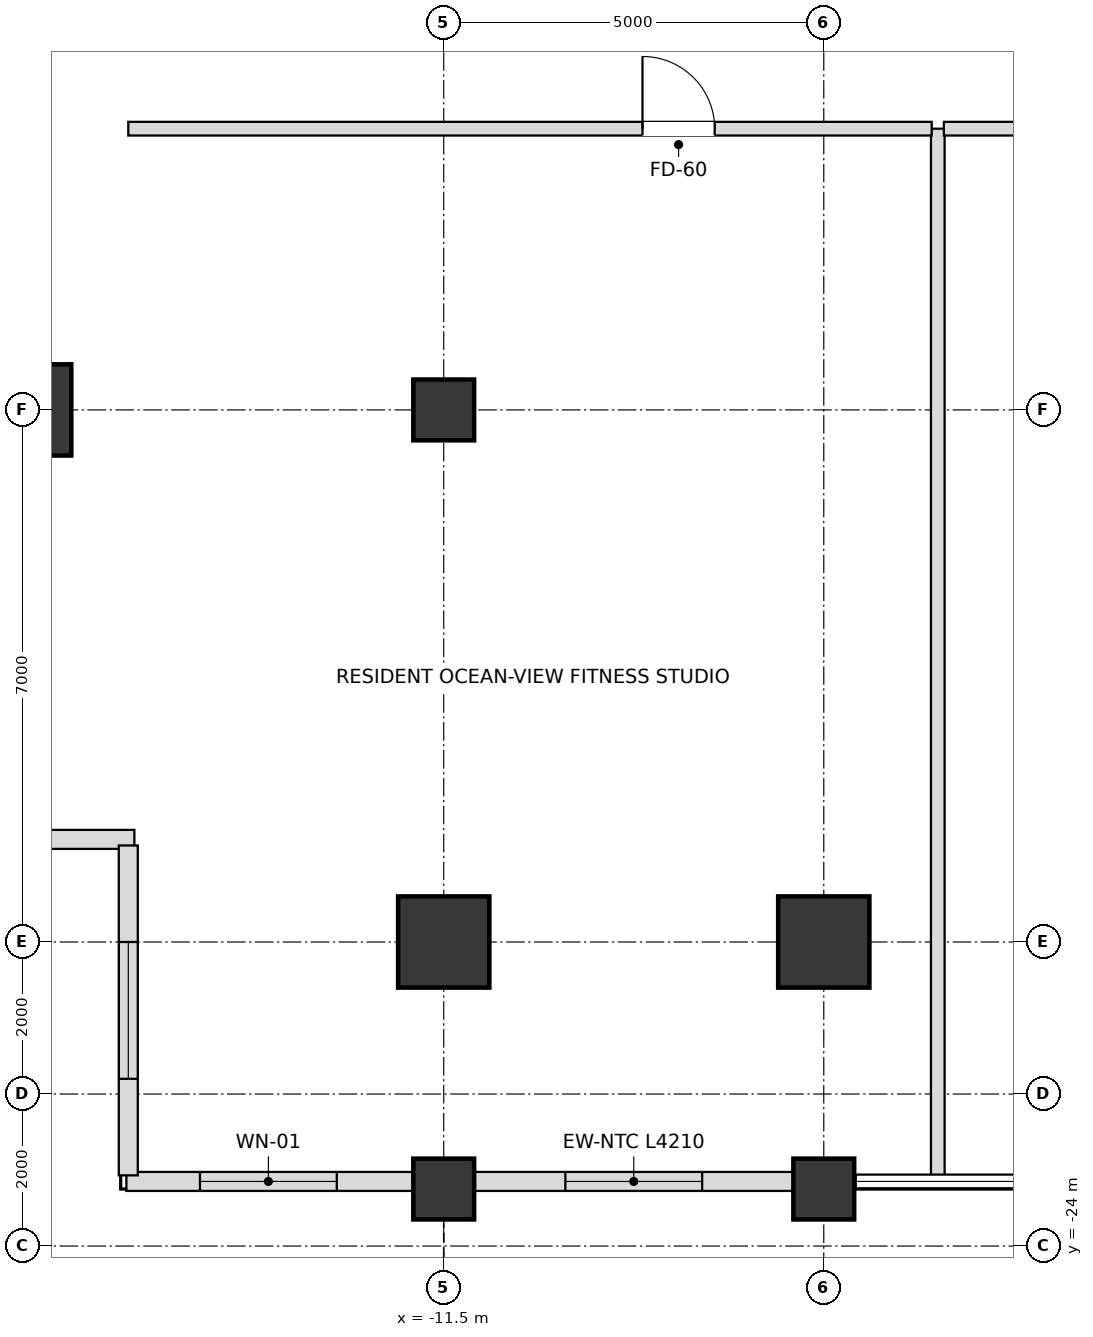
"""IFC4 building model, lengths in metres.
Left out: names, types, materials, properties, quantities, classifications, styles, units other than length and angle.
Written with IfcOpenShell. Run it as: python <this file> out.ifc"""

import sys

from ifc_helpers import new_model, si_unit, direction, frame, frame_2d, origin, origin_2d, place, context, subcontext, project, spatial, rectangle, extrude, element, fill, save


model = new_model("IFC4")
c1 = context("Model", 3, precision=1e-05, world=origin(), true_north=direction((0.0, 1.0)))
c2 = subcontext(c1, "Body", "Model", "MODEL_VIEW")
j1 = project(units=[si_unit("LENGTHUNIT", "METRE"), si_unit("PLANEANGLEUNIT", "RADIAN")], contexts=[c1])
p1 = place(None, origin())
s1 = spatial("IfcSite", under=j1, at=p1, CompositionType="ELEMENT")
p2 = place(p1, origin())
s2 = spatial("IfcBuilding", under=s1, at=p2, CompositionType="ELEMENT")
p3 = place(p2, frame((0.0, 0.0, 109.8)))
s3 = spatial("IfcBuildingStorey", under=s2, at=p3, CompositionType="ELEMENT", Elevation=109.8)
for number, where, z_axis, x_axis in (
    (1, (-11.5, -20.0, 0.0), (0.0, 0.0, 1.0), (1.0, 0.0, 0.0)),
    (2, (-6.5, -20.0, 0.0), (0.0, 0.0, 1.0), (1.0, 0.0, 0.0)),
    (3, (-17.0, -13.0, 0.0), (0.0, 0.0, 1.0), (1.0, 0.0, 0.0)),
):
    element("IfcColumn", number, at=place(p3, frame(where, z_axis=z_axis, x_axis=x_axis)), inside=s3, PredefinedType="USERDEFINED", context=c2, shape_type="SweptSolid", body=[
        extrude(rectangle(XDim=1.2, YDim=1.2, at=origin_2d()), origin(), (0.0, 0.0, 1.0), 3.6),
    ])
for number, where, z_axis, x_axis in (
    (4, (-11.5, -13.0, 0.0), (0.0, 0.0, 1.0), (1.0, 0.0, 0.0)),
    (5, (-11.5, -23.25, 0.0), (0.0, 0.0, 1.0), (1.0, 0.0, 0.0)),
    (6, (-6.5, -23.25, 0.0), (0.0, 0.0, 1.0), (1.0, 0.0, 0.0)),
):
    element("IfcColumn", number, at=place(p3, frame(where, z_axis=z_axis, x_axis=x_axis)), inside=s3, PredefinedType="COLUMN", context=c2, shape_type="SweptSolid", body=[
        extrude(rectangle(XDim=0.8, YDim=0.8, at=origin_2d()), origin(), (0.0, 0.0, 1.0), 3.6),
    ])
p4 = place(p3, frame((-15.675, -23.15, 0.0), z_axis=(0.0, 0.0, 1.0), x_axis=(1.0, 0.0, 0.0)))
e7 = element("IfcWall", 7, at=p4, inside=s3, PredefinedType="SOLIDWALL", context=c2, shape_type="SweptSolid", body=[
    extrude(rectangle(XDim=3.78, YDim=0.25, at=frame_2d((1.89, 0.0))), origin(), (0.0, 0.0, 1.0), 2.736),
])
p5 = place(p4, frame((0.968, 0.0, 0.72)))
e8 = element("IfcOpeningElement", 8, at=p5, cuts=e7, PredefinedType="OPENING", context=c2, shape_type="SweptSolid", body=[
    extrude(rectangle(XDim=1.8, YDim=1.68, at=frame_2d((0.9, 0.84))), frame((0.0, 0.135, 0.0), z_axis=(0.0, -1.0, 0.0), x_axis=(1.0, 0.0, 0.0)), (0.0, 0.0, 1.0), 0.27),
])
p6 = place(p3, frame((-11.105, -23.15, 0.0), z_axis=(0.0, 0.0, 1.0), x_axis=(1.0, 0.0, 0.0)))
e9 = element("IfcWall", 9, at=p6, inside=s3, PredefinedType="SOLIDWALL", context=c2, shape_type="SweptSolid", body=[
    extrude(rectangle(XDim=4.21, YDim=0.25, at=frame_2d((2.105, 0.0))), origin(), (0.0, 0.0, 1.0), 2.736),
])
p7 = place(p6, frame((1.205, 0.0, 0.72)))
e10 = element("IfcOpeningElement", 10, at=p7, cuts=e9, PredefinedType="OPENING", context=c2, shape_type="SweptSolid", body=[
    extrude(rectangle(XDim=1.8, YDim=1.68, at=frame_2d((0.9, 0.84))), frame((0.0, 0.135, 0.0), z_axis=(0.0, -1.0, 0.0), x_axis=(1.0, 0.0, 0.0)), (0.0, 0.0, 1.0), 0.27),
])
p8 = place(p3, frame((-20.23, -18.65, 0.0), z_axis=(0.0, 0.0, 1.0), x_axis=(1.0, 0.0, 0.0)))
e11 = element("IfcWall", 11, at=p8, inside=s3, PredefinedType="SOLIDWALL", context=c2, shape_type="SweptSolid", body=[
    extrude(rectangle(XDim=4.66, YDim=0.25, at=frame_2d((2.33, 0.0))), origin(), (0.0, 0.0, 1.0), 2.736),
])
p9 = place(p8, frame((1.43, 0.0, 0.72)))
e12 = element("IfcOpeningElement", 12, at=p9, cuts=e11, PredefinedType="OPENING", context=c2, shape_type="SweptSolid", body=[
    extrude(rectangle(XDim=1.8, YDim=1.68, at=frame_2d((0.9, 0.84))), frame((0.0, 0.135, 0.0), z_axis=(0.0, -1.0, 0.0), x_axis=(1.0, 0.0, 0.0)), (0.0, 0.0, 1.0), 0.27),
])
p10 = place(p3, frame((-15.65, -18.73, 0.0), z_axis=(0.0, 0.0, 1.0), x_axis=(0.0, -1.0, 0.0)))
e13 = element("IfcWall", 13, at=p10, inside=s3, PredefinedType="SOLIDWALL", context=c2, shape_type="SweptSolid", body=[
    extrude(rectangle(XDim=4.34, YDim=0.25, at=frame_2d((2.17, 0.0))), origin(), (0.0, 0.0, 1.0), 2.736),
])
p11 = place(p10, frame((1.27, 0.0, 0.72)))
e14 = element("IfcOpeningElement", 14, at=p11, cuts=e13, PredefinedType="OPENING", context=c2, shape_type="SweptSolid", body=[
    extrude(rectangle(XDim=1.8, YDim=1.68, at=frame_2d((0.9, 0.84))), frame((0.0, 0.135, 0.0), z_axis=(0.0, -1.0, 0.0), x_axis=(1.0, 0.0, 0.0)), (0.0, 0.0, 1.0), 0.27),
])
p12 = place(p3, frame((-5.0, -23.15, 0.0), z_axis=(0.0, 0.0, 1.0), x_axis=(0.0, 1.0, 0.0)))
e15 = element("IfcWall", 15, at=p12, inside=s3, PredefinedType="PARTITIONING", context=c2, shape_type="SweptSolid", body=[
    extrude(rectangle(XDim=13.85, YDim=0.18, at=frame_2d((6.925, 0.0))), origin(), (0.0, 0.0, 1.0), 2.816),
])
p13 = place(p3, frame((-15.65, -9.3, 0.0), z_axis=(0.0, 0.0, 1.0), x_axis=(1.0, 0.0, 0.0)))
e16 = element("IfcWall", 16, at=p13, inside=s3, PredefinedType="PARTITIONING", context=c2, shape_type="SweptSolid", body=[
    extrude(rectangle(XDim=10.57, YDim=0.18, at=frame_2d((5.285, 0.0))), origin(), (0.0, 0.0, 1.0), 2.816),
])
p14 = place(p13, frame((6.765, 0.0, 0.0)))
e17 = element("IfcOpeningElement", 17, at=p14, cuts=e16, PredefinedType="OPENING", context=c2, shape_type="SweptSolid", body=[
    extrude(rectangle(XDim=0.95, YDim=2.15, at=frame_2d((0.475, 1.075))), frame((0.0, 0.1, 0.0), z_axis=(0.0, -1.0, 0.0), x_axis=(1.0, 0.0, 0.0)), (0.0, 0.0, 1.0), 0.2),
])
p15 = place(p3, frame((-4.92, -9.3, 0.0), z_axis=(0.0, 0.0, 1.0), x_axis=(1.0, 0.0, 0.0)))
e18 = element("IfcWall", 18, at=p15, inside=s3, PredefinedType="PARTITIONING", context=c2, shape_type="SweptSolid", body=[
    extrude(rectangle(XDim=14.84, YDim=0.18, at=frame_2d((7.42, 0.0))), origin(), (0.0, 0.0, 1.0), 2.816),
])
p16 = place(p15, frame((6.945, 0.0, 0.0)))
e19 = element("IfcOpeningElement", 19, at=p16, cuts=e18, PredefinedType="OPENING", context=c2, shape_type="SweptSolid", body=[
    extrude(rectangle(XDim=0.95, YDim=2.15, at=frame_2d((0.475, 1.075))), frame((0.0, 0.1, 0.0), z_axis=(0.0, -1.0, 0.0), x_axis=(1.0, 0.0, 0.0)), (0.0, 0.0, 1.0), 0.2),
])
p17 = place(p5, origin())
e20 = element("IfcWindow", 20, at=p17, inside=s3, PartitioningType="SINGLE_PANEL", PredefinedType="WINDOW", context=c2, shape_type="SweptSolid", body=[
    extrude(rectangle(XDim=1.8, YDim=1.68, at=frame_2d((0.9, 0.84))), frame((0.0, 0.03, 0.0), z_axis=(0.0, -1.0, 0.0), x_axis=(1.0, 0.0, 0.0)), (0.0, 0.0, 1.0), 0.06),
])
fill(e8, e20)
p18 = place(p7, origin())
e21 = element("IfcWindow", 21, at=p18, inside=s3, PartitioningType="SINGLE_PANEL", PredefinedType="WINDOW", context=c2, shape_type="SweptSolid", body=[
    extrude(rectangle(XDim=1.8, YDim=1.68, at=frame_2d((0.9, 0.84))), frame((0.0, 0.03, 0.0), z_axis=(0.0, -1.0, 0.0), x_axis=(1.0, 0.0, 0.0)), (0.0, 0.0, 1.0), 0.06),
])
fill(e10, e21)
p19 = place(p11, origin())
e22 = element("IfcWindow", 22, at=p19, inside=s3, PartitioningType="SINGLE_PANEL", PredefinedType="WINDOW", context=c2, shape_type="SweptSolid", body=[
    extrude(rectangle(XDim=1.8, YDim=1.68, at=frame_2d((0.9, 0.84))), frame((0.0, 0.03, 0.0), z_axis=(0.0, -1.0, 0.0), x_axis=(1.0, 0.0, 0.0)), (0.0, 0.0, 1.0), 0.06),
])
fill(e14, e22)
p20 = place(p14, origin())
e23 = element("IfcDoor", 23, at=p20, inside=s3, OperationType="SINGLE_SWING_LEFT", PredefinedType="DOOR", context=c2, shape_type="SweptSolid", body=[
    extrude(rectangle(XDim=0.95, YDim=2.15, at=frame_2d((0.475, 1.075))), frame((0.0, 0.025, 0.0), z_axis=(0.0, -1.0, 0.0), x_axis=(1.0, 0.0, 0.0)), (0.0, 0.0, 1.0), 0.05),
])
fill(e17, e23)
save(model, sys.argv[1])
